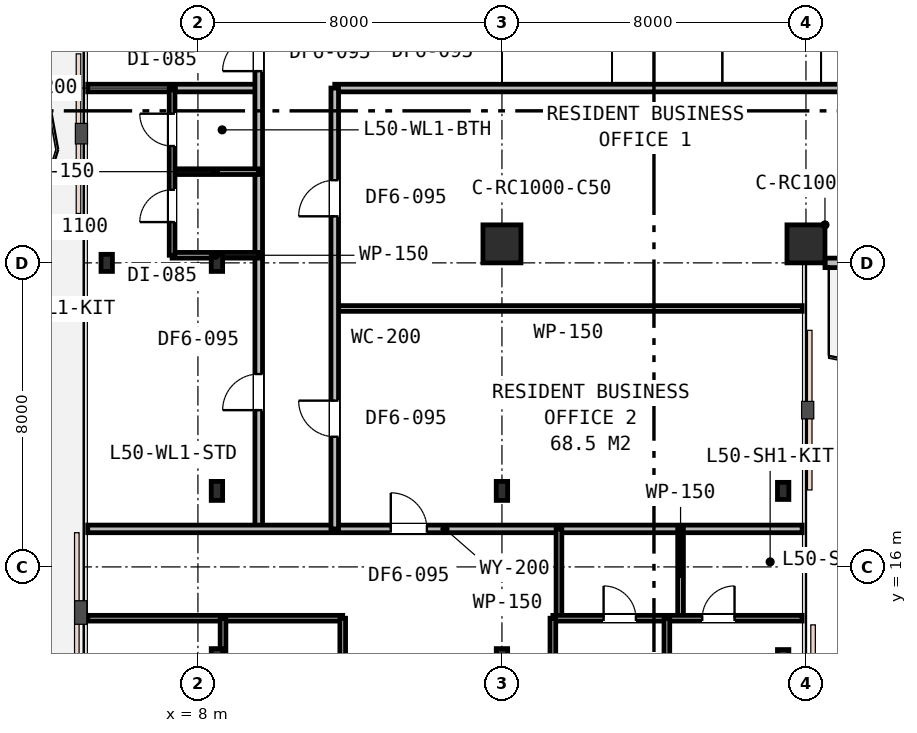
"""IFC4 building model, lengths in metres.
Left out: names, types, materials, properties, quantities, classifications, styles, units other than length and angle.
Written with IfcOpenShell. Run it as: python <this file> out.ifc"""

import sys

from ifc_helpers import new_model, si_unit, direction, frame, frame_2d, origin, origin_2d, place, context, subcontext, project, spatial, rectangle, i_section, extrude, element, fill, save


model = new_model("IFC4")
c1 = context("Model", 3, precision=1e-05, world=origin(), true_north=direction((0.0, 1.0)))
c2 = subcontext(c1, "Body", "Model", "MODEL_VIEW")
j1 = project(units=[si_unit("LENGTHUNIT", "METRE"), si_unit("PLANEANGLEUNIT", "RADIAN")], contexts=[c1])
p1 = place(None, origin())
s1 = spatial("IfcSite", under=j1, at=p1, CompositionType="ELEMENT")
p2 = place(p1, origin())
s2 = spatial("IfcBuilding", under=s1, at=p2, CompositionType="ELEMENT")
p3 = place(p2, frame((0.0, 0.0, 193.8)))
s3 = spatial("IfcBuildingStorey", under=s2, at=p3, CompositionType="ELEMENT", Elevation=193.8)
p4 = place(p3, frame((8.5, 24.0, 0.0), z_axis=(0.0, 0.0, 1.0), x_axis=(1.0, 0.0, 0.0)))
e1 = element("IfcColumn", 1, at=p4, inside=s3, PredefinedType="COLUMN", context=c2, shape_type="SweptSolid", body=[
    extrude(i_section(OverallWidth=0.3, OverallDepth=0.45, WebThickness=0.014, FlangeThickness=0.026, FilletRadius=0.027, at=origin_2d()), origin(), (0.0, 0.0, 1.0), 3.6),
])
for number, where, z_axis, x_axis in (
    (2, (16.0, 24.5, 0.0), (0.0, 0.0, 1.0), (1.0, 0.0, 0.0)),
    (3, (24.0, 24.5, 0.0), (0.0, 0.0, 1.0), (1.0, 0.0, 0.0)),
):
    element("IfcColumn", number, at=place(p3, frame(where, z_axis=z_axis, x_axis=x_axis)), inside=s3, PredefinedType="COLUMN", context=c2, shape_type="SweptSolid", body=[
        extrude(rectangle(XDim=1.0, YDim=1.0, at=origin_2d()), origin(), (0.0, 0.0, 1.0), 3.6),
    ])
for number, where, z_axis, x_axis in (
    (4, (5.6, 24.0, 0.0), (0.0, 0.0, 1.0), (1.0, 0.0, 0.0)),
    (5, (23.4, 13.6, 0.0), (0.0, 0.0, 1.0), (1.0, 0.0, 0.0)),
    (6, (23.4, 18.0, 0.0), (0.0, 0.0, 1.0), (1.0, 0.0, 0.0)),
):
    element("IfcColumn", number, at=place(p3, frame(where, z_axis=z_axis, x_axis=x_axis)), inside=s3, PredefinedType="COLUMN", context=c2, shape_type="SweptSolid", body=[
        extrude(i_section(OverallWidth=0.3, OverallDepth=0.45, WebThickness=0.014, FlangeThickness=0.026, FilletRadius=0.027, at=origin_2d()), origin(), (0.0, 0.0, 1.0), 3.6),
    ])
for number, where, z_axis, x_axis in (
    (7, (8.5, 13.6, 0.0), (0.0, 0.0, 1.0), (1.0, 0.0, 0.0)),
    (8, (16.0, 13.6, 0.0), (0.0, 0.0, 1.0), (1.0, 0.0, 0.0)),
    (9, (8.5, 18.0, 0.0), (0.0, 0.0, 1.0), (1.0, 0.0, 0.0)),
    (10, (16.0, 18.0, 0.0), (0.0, 0.0, 1.0), (1.0, 0.0, 0.0)),
):
    element("IfcColumn", number, at=place(p3, frame(where, z_axis=z_axis, x_axis=x_axis)), inside=s3, PredefinedType="COLUMN", context=c2, shape_type="SweptSolid", body=[
        extrude(i_section(OverallWidth=0.3, OverallDepth=0.5, WebThickness=0.015, FlangeThickness=0.028, FilletRadius=0.027, at=origin_2d()), origin(), (0.0, 0.0, 1.0), 3.6),
    ])
p5 = place(p3, frame((24.5, 24.0, 0.0), z_axis=(0.0, 0.0, 1.0), x_axis=(1.0, 0.0, 0.0)))
e11 = element("IfcWall", 11, at=p5, inside=s3, PredefinedType="STANDARD", context=c2, shape_type="SweptSolid", body=[
    extrude(rectangle(XDim=1.35, YDim=0.25, at=frame_2d((0.675, 0.0))), origin(), (0.0, 0.0, 1.0), 3.02),
])
p6 = place(p3, frame((5.1, 28.6, 0.0), z_axis=(0.0, 0.0, 1.0), x_axis=(1.0, 0.0, 0.0)))
e12 = element("IfcWall", 12, at=p6, inside=s3, PredefinedType="PARTITIONING", context=c2, shape_type="SweptSolid", body=[
    extrude(rectangle(XDim=4.5, YDim=0.2, at=frame_2d((2.25, 0.0))), origin(), (0.0, 0.0, 1.0), 2.92),
])
p7 = place(p3, frame((11.6, 28.6, 0.0), z_axis=(0.0, 0.0, 1.0), x_axis=(1.0, 0.0, 0.0)))
e13 = element("IfcWall", 13, at=p7, inside=s3, PredefinedType="PARTITIONING", context=c2, shape_type="SweptSolid", body=[
    extrude(rectangle(XDim=39.3, YDim=0.2, at=frame_2d((19.65, 0.0))), origin(), (0.0, 0.0, 1.0), 2.92),
])
p8 = place(p7, frame((15.825, 0.0, 0.0)))
e14 = element("IfcOpeningElement", 14, at=p8, cuts=e13, PredefinedType="OPENING", context=c2, shape_type="SweptSolid", body=[
    extrude(rectangle(XDim=0.95, YDim=2.15, at=frame_2d((0.475, 1.075))), frame((0.0, 0.11, 0.0), z_axis=(0.0, -1.0, 0.0), x_axis=(1.0, 0.0, 0.0)), (0.0, 0.0, 1.0), 0.22),
])
p9 = place(p7, frame((29.275, 0.0, 0.0)))
e15 = element("IfcOpeningElement", 15, at=p9, cuts=e13, PredefinedType="OPENING", context=c2, shape_type="SweptSolid", body=[
    extrude(rectangle(XDim=0.95, YDim=2.15, at=frame_2d((0.475, 1.075))), frame((0.0, 0.11, 0.0), z_axis=(0.0, -1.0, 0.0), x_axis=(1.0, 0.0, 0.0)), (0.0, 0.0, 1.0), 0.22),
])
p10 = place(p3, frame((9.6, 17.0, 0.0), z_axis=(0.0, 0.0, 1.0), x_axis=(0.0, 1.0, 0.0)))
e16 = element("IfcWall", 16, at=p10, inside=s3, PredefinedType="PARTITIONING", context=c2, shape_type="SweptSolid", body=[
    extrude(rectangle(XDim=25.9, YDim=0.2, at=frame_2d((12.95, 0.0))), origin(), (0.0, 0.0, 1.0), 2.92),
])
p11 = place(p10, frame((12.045, 0.0, 0.0)))
e17 = element("IfcOpeningElement", 17, at=p11, cuts=e16, PredefinedType="OPENING", context=c2, shape_type="SweptSolid", body=[
    extrude(rectangle(XDim=0.95, YDim=2.15, at=frame_2d((0.475, 1.075))), frame((0.0, 0.11, 0.0), z_axis=(0.0, -1.0, 0.0), x_axis=(1.0, 0.0, 0.0)), (0.0, 0.0, 1.0), 0.22),
])
p12 = place(p10, frame((3.125, 0.0, 0.0)))
e18 = element("IfcOpeningElement", 18, at=p12, cuts=e16, PredefinedType="OPENING", context=c2, shape_type="SweptSolid", body=[
    extrude(rectangle(XDim=0.95, YDim=2.15, at=frame_2d((0.475, 1.075))), frame((0.0, 0.11, 0.0), z_axis=(0.0, -1.0, 0.0), x_axis=(1.0, 0.0, 0.0)), (0.0, 0.0, 1.0), 0.22),
])
p13 = place(p3, frame((5.1, 17.0, 0.0), z_axis=(0.0, 0.0, 1.0), x_axis=(1.0, 0.0, 0.0)))
e19 = element("IfcWall", 19, at=p13, inside=s3, PredefinedType="PARTITIONING", context=c2, shape_type="SweptSolid", body=[
    extrude(rectangle(XDim=18.8, YDim=0.2, at=frame_2d((9.4, 0.0))), origin(), (0.0, 0.0, 1.0), 2.92),
])
p14 = place(p13, frame((7.975, 0.0, 0.0)))
e20 = element("IfcOpeningElement", 20, at=p14, cuts=e19, PredefinedType="OPENING", context=c2, shape_type="SweptSolid", body=[
    extrude(rectangle(XDim=0.95, YDim=2.15, at=frame_2d((0.475, 1.075))), frame((0.0, 0.11, 0.0), z_axis=(0.0, -1.0, 0.0), x_axis=(1.0, 0.0, 0.0)), (0.0, 0.0, 1.0), 0.22),
])
for number, where, z_axis, x_axis in (
    (21, (7.32, 24.2, 0.0), (0.0, 0.0, 1.0), (1.0, 0.0, 0.0)),
    (22, (7.32, 26.4, 0.0), (0.0, 0.0, 1.0), (1.0, 0.0, 0.0)),
):
    element("IfcWall", number, at=place(p3, frame(where, z_axis=z_axis, x_axis=x_axis)), inside=s3, PredefinedType="PARTITIONING", context=c2, shape_type="SweptSolid", body=[
        extrude(rectangle(XDim=2.28, YDim=0.15, at=frame_2d((1.14, 0.0))), origin(), (0.0, 0.0, 1.0), 2.92),
    ])
p15 = place(p3, frame((7.32, 24.2, 0.0), z_axis=(0.0, 0.0, 1.0), x_axis=(0.0, 1.0, 0.0)))
e23 = element("IfcWall", 23, at=p15, inside=s3, PredefinedType="PARTITIONING", context=c2, shape_type="SweptSolid", body=[
    extrude(rectangle(XDim=4.4, YDim=0.15, at=frame_2d((2.2, 0.0))), origin(), (0.0, 0.0, 1.0), 2.92),
])
p16 = place(p15, frame((0.873, 0.0, 0.0)))
e24 = element("IfcOpeningElement", 24, at=p16, cuts=e23, PredefinedType="OPENING", context=c2, shape_type="SweptSolid", body=[
    extrude(rectangle(XDim=0.85, YDim=2.15, at=frame_2d((0.425, 1.075))), frame((0.0, 0.085, 0.0), z_axis=(0.0, -1.0, 0.0), x_axis=(1.0, 0.0, 0.0)), (0.0, 0.0, 1.0), 0.17),
])
p17 = place(p15, frame((2.875, 0.0, 0.0)))
e25 = element("IfcOpeningElement", 25, at=p17, cuts=e23, PredefinedType="OPENING", context=c2, shape_type="SweptSolid", body=[
    extrude(rectangle(XDim=0.85, YDim=2.15, at=frame_2d((0.425, 1.075))), frame((0.0, 0.085, 0.0), z_axis=(0.0, -1.0, 0.0), x_axis=(1.0, 0.0, 0.0)), (0.0, 0.0, 1.0), 0.17),
])
p18 = place(p3, frame((11.6, 22.8, 0.0), z_axis=(0.0, 0.0, 1.0), x_axis=(1.0, 0.0, 0.0)))
e26 = element("IfcWall", 26, at=p18, inside=s3, PredefinedType="PARTITIONING", context=c2, shape_type="SweptSolid", body=[
    extrude(rectangle(XDim=12.3, YDim=0.15, at=frame_2d((6.15, 0.0))), origin(), (0.0, 0.0, 1.0), 2.92),
])
p19 = place(p3, frame((11.6, 17.0, 0.0), z_axis=(0.0, 0.0, 1.0), x_axis=(0.0, 1.0, 0.0)))
e27 = element("IfcWall", 27, at=p19, inside=s3, PredefinedType="PARTITIONING", context=c2, shape_type="SweptSolid", body=[
    extrude(rectangle(XDim=11.6, YDim=0.2, at=frame_2d((5.8, 0.0))), origin(), (0.0, 0.0, 1.0), 2.92),
])
p20 = place(p19, frame((8.225, 0.0, 0.0)))
e28 = element("IfcOpeningElement", 28, at=p20, cuts=e27, PredefinedType="OPENING", context=c2, shape_type="SweptSolid", body=[
    extrude(rectangle(XDim=0.95, YDim=2.15, at=frame_2d((0.475, 1.075))), frame((0.0, 0.11, 0.0), z_axis=(0.0, -1.0, 0.0), x_axis=(1.0, 0.0, 0.0)), (0.0, 0.0, 1.0), 0.22),
])
p21 = place(p19, frame((2.425, 0.0, 0.0)))
e29 = element("IfcOpeningElement", 29, at=p21, cuts=e27, PredefinedType="OPENING", context=c2, shape_type="SweptSolid", body=[
    extrude(rectangle(XDim=0.95, YDim=2.15, at=frame_2d((0.475, 1.075))), frame((0.0, 0.11, 0.0), z_axis=(0.0, -1.0, 0.0), x_axis=(1.0, 0.0, 0.0)), (0.0, 0.0, 1.0), 0.22),
])
p22 = place(p3, frame((17.5, 14.65, 0.0), z_axis=(0.0, 0.0, 1.0), x_axis=(0.0, 1.0, 0.0)))
e30 = element("IfcWall", 30, at=p22, inside=s3, PredefinedType="PARTITIONING", context=c2, shape_type="SweptSolid", body=[
    extrude(rectangle(XDim=2.35, YDim=0.15, at=frame_2d((1.175, 0.0))), origin(), (0.0, 0.0, 1.0), 3.33),
])
p23 = place(p3, frame((20.7, 14.65, 0.0), z_axis=(0.0, 0.0, 1.0), x_axis=(0.0, 1.0, 0.0)))
e31 = element("IfcWall", 31, at=p23, inside=s3, PredefinedType="PARTITIONING", context=c2, shape_type="SweptSolid", body=[
    extrude(rectangle(XDim=2.35, YDim=0.15, at=frame_2d((1.175, 0.0))), origin(), (0.0, 0.0, 1.0), 3.07),
])
p24 = place(p3, frame((17.34, 14.65, 0.0), z_axis=(0.0, 0.0, 1.0), x_axis=(1.0, 0.0, 0.0)))
e32 = element("IfcWall", 32, at=p24, inside=s3, PredefinedType="PARTITIONING", context=c2, shape_type="SweptSolid", body=[
    extrude(rectangle(XDim=6.56, YDim=0.15, at=frame_2d((3.28, 0.0))), origin(), (0.0, 0.0, 1.0), 3.02),
])
p25 = place(p24, frame((1.335, 0.0, 0.0)))
e33 = element("IfcOpeningElement", 33, at=p25, cuts=e32, PredefinedType="OPENING", context=c2, shape_type="SweptSolid", body=[
    extrude(rectangle(XDim=0.85, YDim=2.15, at=frame_2d((0.425, 1.075))), frame((0.0, 0.085, 0.0), z_axis=(0.0, -1.0, 0.0), x_axis=(1.0, 0.0, 0.0)), (0.0, 0.0, 1.0), 0.17),
])
p26 = place(p24, frame((3.93, 0.0, 0.0)))
e34 = element("IfcOpeningElement", 34, at=p26, cuts=e32, PredefinedType="OPENING", context=c2, shape_type="SweptSolid", body=[
    extrude(rectangle(XDim=0.85, YDim=2.15, at=frame_2d((0.425, 1.075))), frame((0.0, 0.085, 0.0), z_axis=(0.0, -1.0, 0.0), x_axis=(1.0, 0.0, 0.0)), (0.0, 0.0, 1.0), 0.17),
])
p27 = place(p3, frame((5.1, 14.65, 0.0), z_axis=(0.0, 0.0, 1.0), x_axis=(1.0, 0.0, 0.0)))
e35 = element("IfcWall", 35, at=p27, inside=s3, PredefinedType="PARTITIONING", context=c2, shape_type="SweptSolid", body=[
    extrude(rectangle(XDim=6.71, YDim=0.15, at=frame_2d((3.355, 0.0))), origin(), (0.0, 0.0, 1.0), 2.92),
])
p28 = place(p3, frame((8.66, 5.1, 0.0), z_axis=(0.0, 0.0, 1.0), x_axis=(0.0, 1.0, 0.0)))
e36 = element("IfcWall", 36, at=p28, inside=s3, PredefinedType="PARTITIONING", context=c2, shape_type="SweptSolid", body=[
    extrude(rectangle(XDim=9.55, YDim=0.15, at=frame_2d((4.775, 0.0))), origin(), (0.0, 0.0, 1.0), 2.92),
])
p29 = place(p28, frame((4.779, 0.0, 0.0)))
e37 = element("IfcOpeningElement", 37, at=p29, cuts=e36, PredefinedType="OPENING", context=c2, shape_type="SweptSolid", body=[
    extrude(rectangle(XDim=0.9, YDim=2.15, at=frame_2d((0.45, 1.075))), frame((0.0, 0.085, 0.0), z_axis=(0.0, -1.0, 0.0), x_axis=(1.0, 0.0, 0.0)), (0.0, 0.0, 1.0), 0.17),
])
p30 = place(p3, frame((20.34, 5.1, 0.0), z_axis=(0.0, 0.0, 1.0), x_axis=(0.0, 1.0, 0.0)))
e38 = element("IfcWall", 38, at=p30, inside=s3, PredefinedType="PARTITIONING", context=c2, shape_type="SweptSolid", body=[
    extrude(rectangle(XDim=9.55, YDim=0.15, at=frame_2d((4.775, 0.0))), origin(), (0.0, 0.0, 1.0), 2.92),
])
p31 = place(p30, frame((4.325, 0.0, 0.0)))
e39 = element("IfcOpeningElement", 39, at=p31, cuts=e38, PredefinedType="OPENING", context=c2, shape_type="SweptSolid", body=[
    extrude(rectangle(XDim=0.9, YDim=2.15, at=frame_2d((0.45, 1.075))), frame((0.0, 0.085, 0.0), z_axis=(0.0, -1.0, 0.0), x_axis=(1.0, 0.0, 0.0)), (0.0, 0.0, 1.0), 0.17),
])
p32 = place(p3, frame((17.34, 5.1, 0.0), z_axis=(0.0, 0.0, 1.0), x_axis=(0.0, 1.0, 0.0)))
e40 = element("IfcWall", 40, at=p32, inside=s3, PredefinedType="PARTITIONING", context=c2, shape_type="SweptSolid", body=[
    extrude(rectangle(XDim=9.55, YDim=0.15, at=frame_2d((4.775, 0.0))), origin(), (0.0, 0.0, 1.0), 2.92),
])
p33 = place(p32, frame((4.779, 0.0, 0.0)))
e41 = element("IfcOpeningElement", 41, at=p33, cuts=e40, PredefinedType="OPENING", context=c2, shape_type="SweptSolid", body=[
    extrude(rectangle(XDim=0.9, YDim=2.15, at=frame_2d((0.45, 1.075))), frame((0.0, 0.085, 0.0), z_axis=(0.0, -1.0, 0.0), x_axis=(1.0, 0.0, 0.0)), (0.0, 0.0, 1.0), 0.17),
])
p34 = place(p3, frame((11.81, 5.1, 0.0), z_axis=(0.0, 0.0, 1.0), x_axis=(0.0, 1.0, 0.0)))
e42 = element("IfcWall", 42, at=p34, inside=s3, PredefinedType="PARTITIONING", context=c2, shape_type="SweptSolid", body=[
    extrude(rectangle(XDim=9.55, YDim=0.15, at=frame_2d((4.775, 0.0))), origin(), (0.0, 0.0, 1.0), 2.92),
])
p35 = place(p34, frame((4.325, 0.0, 0.0)))
e43 = element("IfcOpeningElement", 43, at=p35, cuts=e42, PredefinedType="OPENING", context=c2, shape_type="SweptSolid", body=[
    extrude(rectangle(XDim=0.9, YDim=2.15, at=frame_2d((0.45, 1.075))), frame((0.0, 0.085, 0.0), z_axis=(0.0, -1.0, 0.0), x_axis=(1.0, 0.0, 0.0)), (0.0, 0.0, 1.0), 0.17),
])
p36 = place(p11, origin())
e44 = element("IfcDoor", 44, at=p36, inside=s3, OperationType="SINGLE_SWING_LEFT", PredefinedType="DOOR", context=c2, shape_type="SweptSolid", body=[
    extrude(rectangle(XDim=0.95, YDim=2.15, at=frame_2d((0.475, 1.075))), frame((0.0, 0.025, 0.0), z_axis=(0.0, -1.0, 0.0), x_axis=(1.0, 0.0, 0.0)), (0.0, 0.0, 1.0), 0.05),
])
fill(e17, e44)
p37 = place(p12, origin())
e45 = element("IfcDoor", 45, at=p37, inside=s3, OperationType="SINGLE_SWING_LEFT", PredefinedType="DOOR", context=c2, shape_type="SweptSolid", body=[
    extrude(rectangle(XDim=0.95, YDim=2.15, at=frame_2d((0.475, 1.075))), frame((0.0, 0.025, 0.0), z_axis=(0.0, -1.0, 0.0), x_axis=(1.0, 0.0, 0.0)), (0.0, 0.0, 1.0), 0.05),
])
fill(e18, e45)
p38 = place(p16, origin())
e46 = element("IfcDoor", 46, at=p38, inside=s3, OperationType="SINGLE_SWING_LEFT", PredefinedType="DOOR", context=c2, shape_type="SweptSolid", body=[
    extrude(rectangle(XDim=0.85, YDim=2.15, at=frame_2d((0.425, 1.075))), frame((0.0, 0.025, 0.0), z_axis=(0.0, -1.0, 0.0), x_axis=(1.0, 0.0, 0.0)), (0.0, 0.0, 1.0), 0.05),
])
fill(e24, e46)
p39 = place(p17, origin())
e47 = element("IfcDoor", 47, at=p39, inside=s3, OperationType="SINGLE_SWING_RIGHT", PredefinedType="DOOR", context=c2, shape_type="SweptSolid", body=[
    extrude(rectangle(XDim=0.85, YDim=2.15, at=frame_2d((0.425, 1.075))), frame((0.0, 0.025, 0.0), z_axis=(0.0, -1.0, 0.0), x_axis=(1.0, 0.0, 0.0)), (0.0, 0.0, 1.0), 0.05),
])
fill(e25, e47)
p40 = place(p20, origin())
e48 = element("IfcDoor", 48, at=p40, inside=s3, OperationType="SINGLE_SWING_LEFT", PredefinedType="DOOR", context=c2, shape_type="SweptSolid", body=[
    extrude(rectangle(XDim=0.95, YDim=2.15, at=frame_2d((0.475, 1.075))), frame((0.0, 0.025, 0.0), z_axis=(0.0, -1.0, 0.0), x_axis=(1.0, 0.0, 0.0)), (0.0, 0.0, 1.0), 0.05),
])
fill(e28, e48)
p41 = place(p21, origin())
e49 = element("IfcDoor", 49, at=p41, inside=s3, OperationType="SINGLE_SWING_RIGHT", PredefinedType="DOOR", context=c2, shape_type="SweptSolid", body=[
    extrude(rectangle(XDim=0.95, YDim=2.15, at=frame_2d((0.475, 1.075))), frame((0.0, 0.025, 0.0), z_axis=(0.0, -1.0, 0.0), x_axis=(1.0, 0.0, 0.0)), (0.0, 0.0, 1.0), 0.05),
])
fill(e29, e49)
p42 = place(p14, origin())
e50 = element("IfcDoor", 50, at=p42, inside=s3, OperationType="SINGLE_SWING_LEFT", PredefinedType="DOOR", context=c2, shape_type="SweptSolid", body=[
    extrude(rectangle(XDim=0.95, YDim=2.15, at=frame_2d((0.475, 1.075))), frame((0.0, 0.025, 0.0), z_axis=(0.0, -1.0, 0.0), x_axis=(1.0, 0.0, 0.0)), (0.0, 0.0, 1.0), 0.05),
])
fill(e20, e50)
p43 = place(p25, origin())
e51 = element("IfcDoor", 51, at=p43, inside=s3, OperationType="SINGLE_SWING_LEFT", PredefinedType="DOOR", context=c2, shape_type="SweptSolid", body=[
    extrude(rectangle(XDim=0.85, YDim=2.15, at=frame_2d((0.425, 1.075))), frame((0.0, 0.025, 0.0), z_axis=(0.0, -1.0, 0.0), x_axis=(1.0, 0.0, 0.0)), (0.0, 0.0, 1.0), 0.05),
])
fill(e33, e51)
p44 = place(p26, origin())
e52 = element("IfcDoor", 52, at=p44, inside=s3, OperationType="SINGLE_SWING_RIGHT", PredefinedType="DOOR", context=c2, shape_type="SweptSolid", body=[
    extrude(rectangle(XDim=0.85, YDim=2.15, at=frame_2d((0.425, 1.075))), frame((0.0, 0.025, 0.0), z_axis=(0.0, -1.0, 0.0), x_axis=(1.0, 0.0, 0.0)), (0.0, 0.0, 1.0), 0.05),
])
fill(e34, e52)
save(model, sys.argv[1])
